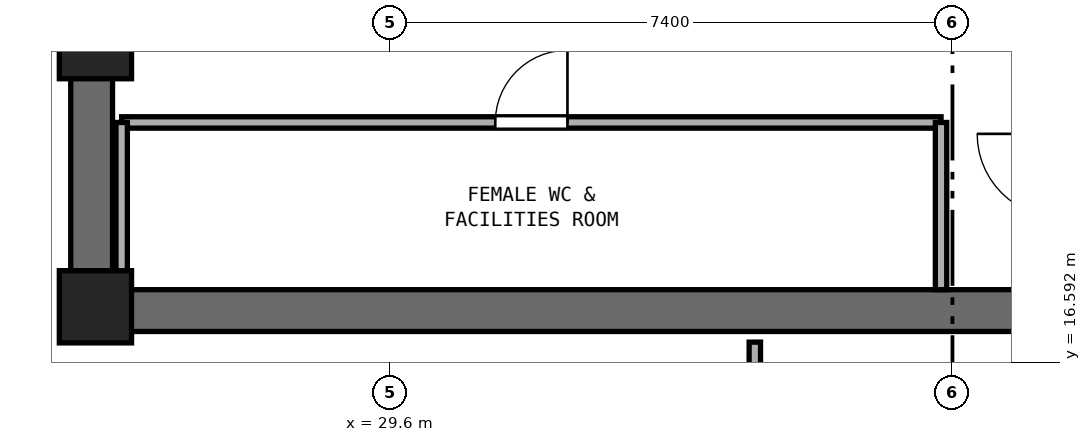
"""IFC4 building model, lengths in metres.
Left out: names, types, materials, properties, quantities, classifications, styles, units other than length and angle.
Written with IfcOpenShell. Run it as: python <this file> out.ifc"""

import sys

from ifc_helpers import new_model, si_unit, direction, frame, frame_2d, origin, origin_2d, place, context, subcontext, project, spatial, rectangle, extrude, element, fill, save


model = new_model("IFC4")
c1 = context("Model", 3, precision=1e-05, world=origin(), true_north=direction((0.0, 1.0)))
c2 = subcontext(c1, "Body", "Model", "MODEL_VIEW")
j1 = project(units=[si_unit("LENGTHUNIT", "METRE"), si_unit("PLANEANGLEUNIT", "RADIAN")], contexts=[c1])
p1 = place(None, origin())
s1 = spatial("IfcSite", under=j1, at=p1, CompositionType="ELEMENT")
p2 = place(p1, origin())
s2 = spatial("IfcBuilding", under=s1, at=p2, CompositionType="ELEMENT")
p3 = place(p2, frame((0.0, 0.0, 185.8)))
s3 = spatial("IfcBuildingStorey", under=s2, at=p3, CompositionType="ELEMENT", Elevation=185.8)
p4 = place(p3, frame((25.4, 17.275, 0.0), z_axis=(0.0, 0.0, 1.0), x_axis=(1.0, 0.0, 0.0)))
e1 = element("IfcWall", 1, at=p4, inside=s3, PredefinedType="SHEAR", context=c2, shape_type="SweptSolid", body=[
    extrude(rectangle(XDim=23.2, YDim=0.55, at=frame_2d((11.6, 0.0))), origin(), (0.0, 0.0, 1.0), 3.54),
])
p5 = place(p3, frame((25.675, 17.55, 0.0), z_axis=(0.0, 0.0, 1.0), x_axis=(0.0, 1.0, 0.0)))
e2 = element("IfcWall", 2, at=p5, inside=s3, PredefinedType="SHEAR", context=c2, shape_type="SweptSolid", body=[
    extrude(rectangle(XDim=15.3, YDim=0.55, at=frame_2d((7.65, 0.0))), origin(), (0.0, 0.0, 1.0), 3.54),
])
p6 = place(p5, frame((6.9, 0.0, 0.0)))
e3 = element("IfcOpeningElement", 3, at=p6, cuts=e2, PredefinedType="OPENING", context=c2, shape_type="SweptSolid", body=[
    extrude(rectangle(XDim=1.5, YDim=2.15, at=frame_2d((0.75, 1.075))), frame((0.0, 0.285, 0.0), z_axis=(0.0, -1.0, 0.0), x_axis=(1.0, 0.0, 0.0)), (0.0, 0.0, 1.0), 0.57),
])
for number, where, z_axis, x_axis in (
    (4, (25.725, 17.325, 0.0), (0.0, 0.0, 1.0), (1.0, 0.0, 0.0)),
    (5, (25.725, 20.8, 0.0), (0.0, 0.0, 1.0), (1.0, 0.0, 0.0)),
):
    element("IfcColumn", number, at=place(p3, frame(where, z_axis=z_axis, x_axis=x_axis)), inside=s3, PredefinedType="PILASTER", context=c2, shape_type="SweptSolid", body=[
        extrude(rectangle(XDim=0.95, YDim=0.95, at=origin_2d()), origin(), (0.0, 0.0, 1.0), 3.8),
    ])
p7 = place(p3, frame((26.07, 19.75, 0.0), z_axis=(0.0, 0.0, 1.0), x_axis=(1.0, 0.0, 0.0)))
e6 = element("IfcWall", 6, at=p7, inside=s3, PredefinedType="PARTITIONING", context=c2, shape_type="SweptSolid", body=[
    extrude(rectangle(XDim=10.78, YDim=0.15, at=frame_2d((5.39, 0.0))), origin(), (0.0, 0.0, 1.0), 3.54),
])
p8 = place(p7, frame((4.915, 0.0, 0.0)))
e7 = element("IfcOpeningElement", 7, at=p8, cuts=e6, PredefinedType="OPENING", context=c2, shape_type="SweptSolid", body=[
    extrude(rectangle(XDim=0.95, YDim=2.1, at=frame_2d((0.475, 1.05))), frame((0.0, 0.085, 0.0), z_axis=(0.0, -1.0, 0.0), x_axis=(1.0, 0.0, 0.0)), (0.0, 0.0, 1.0), 0.17),
])
p9 = place(p3, frame((26.07, 17.55, 0.0), z_axis=(0.0, 0.0, 1.0), x_axis=(0.0, 1.0, 0.0)))
e8 = element("IfcWall", 8, at=p9, inside=s3, PredefinedType="PARTITIONING", context=c2, shape_type="SweptSolid", body=[
    extrude(rectangle(XDim=2.2, YDim=0.15, at=frame_2d((1.1, 0.0))), origin(), (0.0, 0.0, 1.0), 2.64),
])
p10 = place(p3, frame((36.85, 17.55, 0.0), z_axis=(0.0, 0.0, 1.0), x_axis=(0.0, 1.0, 0.0)))
e9 = element("IfcWall", 9, at=p10, inside=s3, PredefinedType="PARTITIONING", context=c2, shape_type="SweptSolid", body=[
    extrude(rectangle(XDim=2.2, YDim=0.15, at=frame_2d((1.1, 0.0))), origin(), (0.0, 0.0, 1.0), 3.54),
])
p11 = place(p3, frame((34.4, 14.85, 0.0), z_axis=(0.0, 0.0, 1.0), x_axis=(0.0, 1.0, 0.0)))
e10 = element("IfcWall", 10, at=p11, inside=s3, PredefinedType="PARTITIONING", context=c2, shape_type="SweptSolid", body=[
    extrude(rectangle(XDim=2.01, YDim=0.15, at=frame_2d((1.005, 0.0))), origin(), (0.0, 0.0, 1.0), 3.54),
])
p12 = place(p8, origin())
e11 = element("IfcDoor", 11, at=p12, inside=s3, OperationType="SINGLE_SWING_RIGHT", PredefinedType="DOOR", context=c2, shape_type="SweptSolid", body=[
    extrude(rectangle(XDim=0.95, YDim=2.1, at=frame_2d((0.475, 1.05))), frame((0.0, 0.025, 0.0), z_axis=(0.0, -1.0, 0.0), x_axis=(1.0, 0.0, 0.0)), (0.0, 0.0, 1.0), 0.05),
])
fill(e7, e11)
save(model, sys.argv[1])
